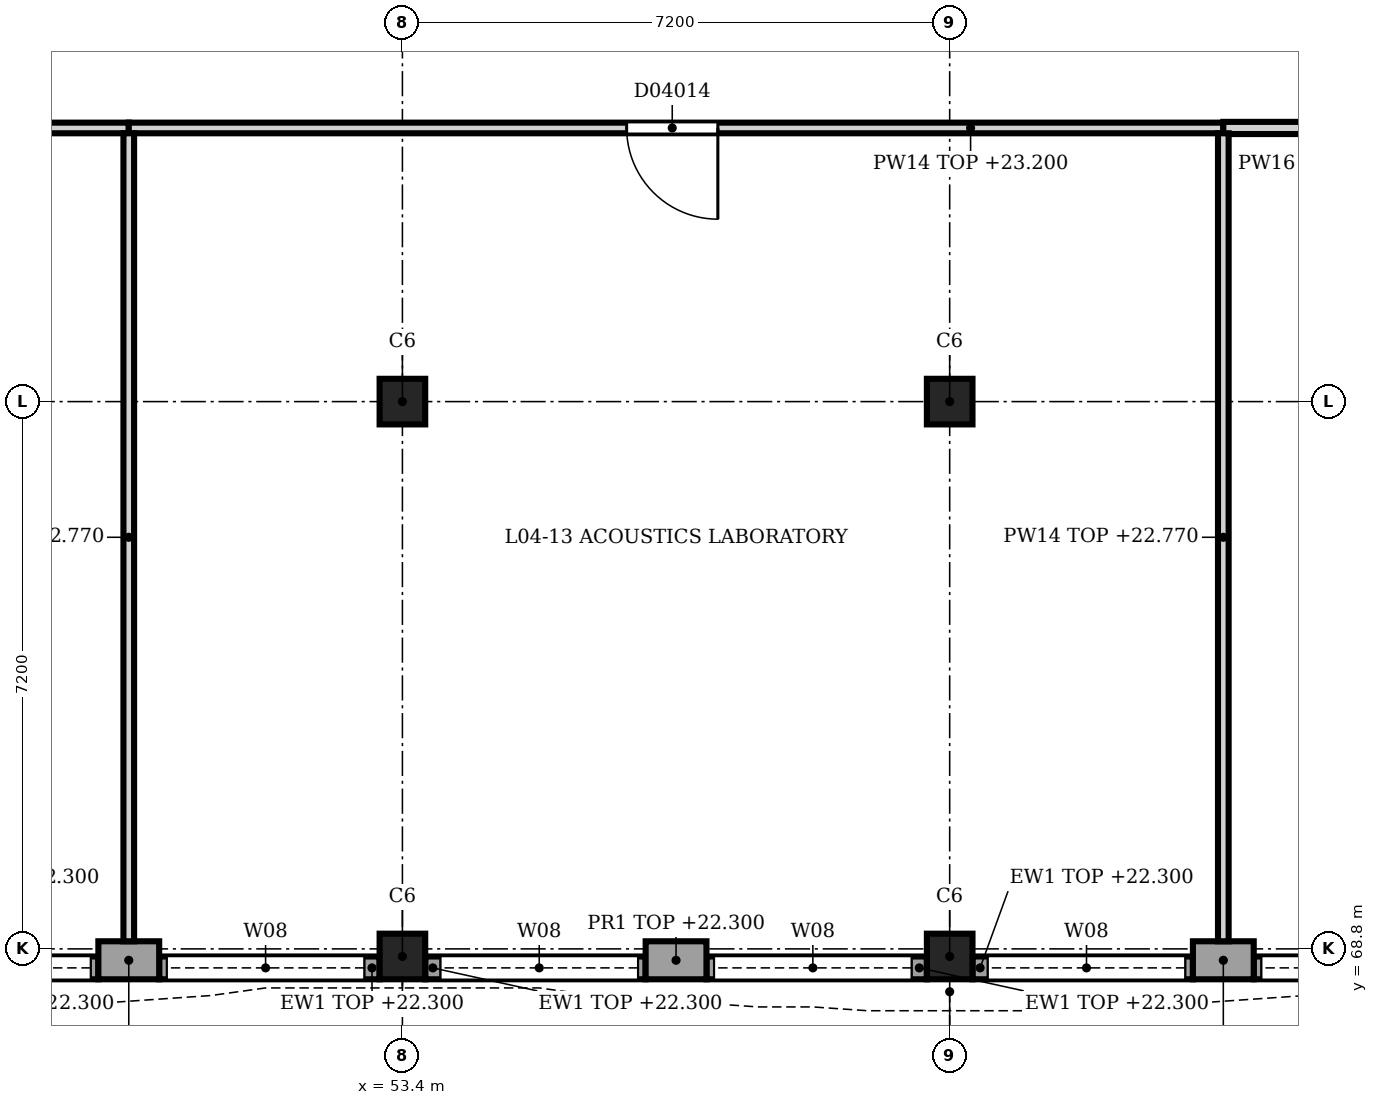
"""IFC4 building model, lengths in metres.
Left out: names, types, materials, properties, quantities, classifications, styles, units other than length and angle.
Written with IfcOpenShell. Run it as: python <this file> out.ifc"""

import sys

from ifc_helpers import new_model, si_unit, direction, frame, frame_2d, origin, origin_2d, place, context, subcontext, project, spatial, rectangle, extrude, element, fill, save


model = new_model("IFC4")
c1 = context("Model", 3, precision=1e-05, world=origin(), true_north=direction((0.0, 1.0)))
c2 = subcontext(c1, "Body", "Model", "MODEL_VIEW")
j1 = project(units=[si_unit("LENGTHUNIT", "METRE"), si_unit("PLANEANGLEUNIT", "RADIAN")], contexts=[c1])
p1 = place(None, origin())
s1 = spatial("IfcSite", under=j1, at=p1, CompositionType="ELEMENT")
p2 = place(p1, origin())
s2 = spatial("IfcBuilding", under=s1, at=p2, CompositionType="ELEMENT")
p3 = place(p2, frame((0.0, 0.0, 18.9)))
s3 = spatial("IfcBuildingStorey", under=s2, at=p3, CompositionType="ELEMENT", Elevation=18.9)
for number, where, z_axis, x_axis in (
    (1, (53.4, 68.7, 0.0), (0.0, 0.0, 1.0), (1.0, 0.0, 0.0)),
    (2, (53.4, 76.0, 0.0), (0.0, 0.0, 1.0), (1.0, 0.0, 0.0)),
    (3, (60.6, 68.7, 0.0), (0.0, 0.0, 1.0), (1.0, 0.0, 0.0)),
    (4, (60.6, 76.0, 0.0), (0.0, 0.0, 1.0), (1.0, 0.0, 0.0)),
):
    element("IfcColumn", number, at=place(p3, frame(where, z_axis=z_axis, x_axis=x_axis)), inside=s3, PredefinedType="COLUMN", context=c2, shape_type="SweptSolid", body=[
        extrude(rectangle(XDim=0.6, YDim=0.6, at=origin_2d()), origin(), (0.0, 0.0, 1.0), 4.5),
    ])
p4 = place(p3, frame((64.6, 68.65, 0.0), z_axis=(0.0, 0.0, 1.0), x_axis=(-1.0, 0.0, 0.0)))
e5 = element("IfcWall", 5, at=p4, inside=s3, PredefinedType="SOLIDWALL", context=c2, shape_type="SweptSolid", body=[
    extrude(rectangle(XDim=0.8, YDim=0.5, at=frame_2d((0.4, 0.0))), origin(), (0.0, 0.0, 1.0), 3.4),
])
p5 = place(p3, frame((57.4, 68.65, 0.0), z_axis=(0.0, 0.0, 1.0), x_axis=(-1.0, 0.0, 0.0)))
e6 = element("IfcWall", 6, at=p5, inside=s3, PredefinedType="SOLIDWALL", context=c2, shape_type="SweptSolid", body=[
    extrude(rectangle(XDim=0.8, YDim=0.5, at=frame_2d((0.4, 0.0))), origin(), (0.0, 0.0, 1.0), 3.4),
])
p6 = place(p3, frame((50.2, 68.65, 0.0), z_axis=(0.0, 0.0, 1.0), x_axis=(-1.0, 0.0, 0.0)))
e7 = element("IfcWall", 7, at=p6, inside=s3, PredefinedType="SOLIDWALL", context=c2, shape_type="SweptSolid", body=[
    extrude(rectangle(XDim=0.8, YDim=0.5, at=frame_2d((0.4, 0.0))), origin(), (0.0, 0.0, 1.0), 3.4),
])
p7 = place(p3, frame((67.5, 68.55, 0.0), z_axis=(0.0, 0.0, 1.0), x_axis=(-1.0, 0.0, 0.0)))
e8 = element("IfcWall", 8, at=p7, inside=s3, PredefinedType="SOLIDWALL", context=c2, shape_type="SweptSolid", body=[
    extrude(rectangle(XDim=2.9, YDim=0.3, at=frame_2d((1.45, 0.0))), origin(), (0.0, 0.0, 1.0), 3.4),
])
p8 = place(p7, frame((0.2, 0.0, 1.2)))
e9 = element("IfcOpeningElement", 9, at=p8, cuts=e8, PredefinedType="OPENING", context=c2, shape_type="SweptSolid", body=[
    extrude(rectangle(XDim=2.6, YDim=2.1, at=frame_2d((1.3, 1.05))), frame((0.0, 0.16, 0.0), z_axis=(0.0, -1.0, 0.0), x_axis=(1.0, 0.0, 0.0)), (0.0, 0.0, 1.0), 0.32),
])
p9 = place(p3, frame((63.8, 68.55, 0.0), z_axis=(0.0, 0.0, 1.0), x_axis=(-1.0, 0.0, 0.0)))
e10 = element("IfcWall", 10, at=p9, inside=s3, PredefinedType="SOLIDWALL", context=c2, shape_type="SweptSolid", body=[
    extrude(rectangle(XDim=2.9, YDim=0.3, at=frame_2d((1.45, 0.0))), origin(), (0.0, 0.0, 1.0), 3.4),
])
p10 = place(p9, frame((0.1, 0.0, 1.2)))
e11 = element("IfcOpeningElement", 11, at=p10, cuts=e10, PredefinedType="OPENING", context=c2, shape_type="SweptSolid", body=[
    extrude(rectangle(XDim=2.6, YDim=2.1, at=frame_2d((1.3, 1.05))), frame((0.0, 0.16, 0.0), z_axis=(0.0, -1.0, 0.0), x_axis=(1.0, 0.0, 0.0)), (0.0, 0.0, 1.0), 0.32),
])
p11 = place(p3, frame((60.3, 68.55, 0.0), z_axis=(0.0, 0.0, 1.0), x_axis=(-1.0, 0.0, 0.0)))
e12 = element("IfcWall", 12, at=p11, inside=s3, PredefinedType="SOLIDWALL", context=c2, shape_type="SweptSolid", body=[
    extrude(rectangle(XDim=2.9, YDim=0.3, at=frame_2d((1.45, 0.0))), origin(), (0.0, 0.0, 1.0), 3.4),
])
p12 = place(p11, frame((0.2, 0.0, 1.2)))
e13 = element("IfcOpeningElement", 13, at=p12, cuts=e12, PredefinedType="OPENING", context=c2, shape_type="SweptSolid", body=[
    extrude(rectangle(XDim=2.6, YDim=2.1, at=frame_2d((1.3, 1.05))), frame((0.0, 0.16, 0.0), z_axis=(0.0, -1.0, 0.0), x_axis=(1.0, 0.0, 0.0)), (0.0, 0.0, 1.0), 0.32),
])
p13 = place(p3, frame((56.6, 68.55, 0.0), z_axis=(0.0, 0.0, 1.0), x_axis=(-1.0, 0.0, 0.0)))
e14 = element("IfcWall", 14, at=p13, inside=s3, PredefinedType="SOLIDWALL", context=c2, shape_type="SweptSolid", body=[
    extrude(rectangle(XDim=2.9, YDim=0.3, at=frame_2d((1.45, 0.0))), origin(), (0.0, 0.0, 1.0), 3.4),
])
p14 = place(p13, frame((0.1, 0.0, 1.2)))
e15 = element("IfcOpeningElement", 15, at=p14, cuts=e14, PredefinedType="OPENING", context=c2, shape_type="SweptSolid", body=[
    extrude(rectangle(XDim=2.6, YDim=2.1, at=frame_2d((1.3, 1.05))), frame((0.0, 0.16, 0.0), z_axis=(0.0, -1.0, 0.0), x_axis=(1.0, 0.0, 0.0)), (0.0, 0.0, 1.0), 0.32),
])
p15 = place(p3, frame((53.1, 68.55, 0.0), z_axis=(0.0, 0.0, 1.0), x_axis=(-1.0, 0.0, 0.0)))
e16 = element("IfcWall", 16, at=p15, inside=s3, PredefinedType="SOLIDWALL", context=c2, shape_type="SweptSolid", body=[
    extrude(rectangle(XDim=2.9, YDim=0.3, at=frame_2d((1.45, 0.0))), origin(), (0.0, 0.0, 1.0), 3.4),
])
p16 = place(p15, frame((0.2, 0.0, 1.2)))
e17 = element("IfcOpeningElement", 17, at=p16, cuts=e16, PredefinedType="OPENING", context=c2, shape_type="SweptSolid", body=[
    extrude(rectangle(XDim=2.6, YDim=2.1, at=frame_2d((1.3, 1.05))), frame((0.0, 0.16, 0.0), z_axis=(0.0, -1.0, 0.0), x_axis=(1.0, 0.0, 0.0)), (0.0, 0.0, 1.0), 0.32),
])
p17 = place(p3, frame((49.4, 68.55, 0.0), z_axis=(0.0, 0.0, 1.0), x_axis=(-1.0, 0.0, 0.0)))
e18 = element("IfcWall", 18, at=p17, inside=s3, PredefinedType="SOLIDWALL", context=c2, shape_type="SweptSolid", body=[
    extrude(rectangle(XDim=2.9, YDim=0.3, at=frame_2d((1.45, 0.0))), origin(), (0.0, 0.0, 1.0), 3.4),
])
p18 = place(p17, frame((0.1, 0.0, 1.2)))
e19 = element("IfcOpeningElement", 19, at=p18, cuts=e18, PredefinedType="OPENING", context=c2, shape_type="SweptSolid", body=[
    extrude(rectangle(XDim=2.6, YDim=2.1, at=frame_2d((1.3, 1.05))), frame((0.0, 0.16, 0.0), z_axis=(0.0, -1.0, 0.0), x_axis=(1.0, 0.0, 0.0)), (0.0, 0.0, 1.0), 0.32),
])
p19 = place(p3, frame((49.8, 79.6, 0.0), z_axis=(0.0, 0.0, 1.0), x_axis=(-1.0, 0.0, 0.0)))
e20 = element("IfcWall", 20, at=p19, inside=s3, PredefinedType="PARTITIONING", context=c2, shape_type="SweptSolid", body=[
    extrude(rectangle(XDim=14.4, YDim=0.14, at=frame_2d((7.2, 0.0))), origin(), (0.0, 0.0, 1.0), 4.3),
])
p20 = place(p19, frame((6.65, 0.0, 0.0)))
e21 = element("IfcOpeningElement", 21, at=p20, cuts=e20, PredefinedType="OPENING", context=c2, shape_type="SweptSolid", body=[
    extrude(rectangle(XDim=1.1, YDim=2.2, at=frame_2d((0.55, 1.1))), frame((0.0, 0.08, 0.0), z_axis=(0.0, -1.0, 0.0), x_axis=(1.0, 0.0, 0.0)), (0.0, 0.0, 1.0), 0.16),
])
p21 = place(p3, frame((64.2, 79.6, 0.0), z_axis=(0.0, 0.0, 1.0), x_axis=(-1.0, 0.0, 0.0)))
e22 = element("IfcWall", 22, at=p21, inside=s3, PredefinedType="PARTITIONING", context=c2, shape_type="SweptSolid", body=[
    extrude(rectangle(XDim=14.4, YDim=0.14, at=frame_2d((7.2, 0.0))), origin(), (0.0, 0.0, 1.0), 4.3),
])
p22 = place(p21, frame((6.65, 0.0, 0.0)))
e23 = element("IfcOpeningElement", 23, at=p22, cuts=e22, PredefinedType="OPENING", context=c2, shape_type="SweptSolid", body=[
    extrude(rectangle(XDim=1.2, YDim=2.1, at=frame_2d((0.6, 1.05))), frame((0.0, 0.08, 0.0), z_axis=(0.0, -1.0, 0.0), x_axis=(1.0, 0.0, 0.0)), (0.0, 0.0, 1.0), 0.16),
])
p23 = place(p3, frame((71.4, 79.6, 0.0), z_axis=(0.0, 0.0, 1.0), x_axis=(-1.0, 0.0, 0.0)))
e24 = element("IfcWall", 24, at=p23, inside=s3, PredefinedType="PARTITIONING", context=c2, shape_type="SweptSolid", body=[
    extrude(rectangle(XDim=7.2, YDim=0.16, at=frame_2d((3.6, 0.0))), origin(), (0.0, 0.0, 1.0), 4.3),
])
p24 = place(p23, frame((2.95, 0.0, 0.0)))
e25 = element("IfcOpeningElement", 25, at=p24, cuts=e24, PredefinedType="OPENING", context=c2, shape_type="SweptSolid", body=[
    extrude(rectangle(XDim=1.3, YDim=2.2, at=frame_2d((0.65, 1.1))), frame((0.0, 0.09, 0.0), z_axis=(0.0, -1.0, 0.0), x_axis=(1.0, 0.0, 0.0)), (0.0, 0.0, 1.0), 0.18),
])
for number, where, z_axis, x_axis in (
    (26, (49.8, 68.9, 0.0), (0.0, 0.0, 1.0), (0.0, 1.0, 0.0)),
    (27, (64.2, 68.9, 0.0), (0.0, 0.0, 1.0), (0.0, 1.0, 0.0)),
):
    element("IfcWall", number, at=place(p3, frame(where, z_axis=z_axis, x_axis=x_axis)), inside=s3, PredefinedType="PARTITIONING", context=c2, shape_type="SweptSolid", body=[
        extrude(rectangle(XDim=10.63, YDim=0.14, at=frame_2d((5.315, 0.0))), origin(), (0.0, 0.0, 1.0), 3.87),
    ])
p25 = place(p8, origin())
e28 = element("IfcWindow", 28, at=p25, inside=s3, PartitioningType="SINGLE_PANEL", PredefinedType="WINDOW", context=c2, shape_type="SweptSolid", body=[
    extrude(rectangle(XDim=2.6, YDim=2.1, at=frame_2d((1.3, 1.05))), frame((0.0, 0.03, 0.0), z_axis=(0.0, -1.0, 0.0), x_axis=(1.0, 0.0, 0.0)), (0.0, 0.0, 1.0), 0.06),
])
fill(e9, e28)
p26 = place(p10, origin())
e29 = element("IfcWindow", 29, at=p26, inside=s3, PartitioningType="SINGLE_PANEL", PredefinedType="WINDOW", context=c2, shape_type="SweptSolid", body=[
    extrude(rectangle(XDim=2.6, YDim=2.1, at=frame_2d((1.3, 1.05))), frame((0.0, 0.03, 0.0), z_axis=(0.0, -1.0, 0.0), x_axis=(1.0, 0.0, 0.0)), (0.0, 0.0, 1.0), 0.06),
])
fill(e11, e29)
p27 = place(p12, origin())
e30 = element("IfcWindow", 30, at=p27, inside=s3, PartitioningType="SINGLE_PANEL", PredefinedType="WINDOW", context=c2, shape_type="SweptSolid", body=[
    extrude(rectangle(XDim=2.6, YDim=2.1, at=frame_2d((1.3, 1.05))), frame((0.0, 0.03, 0.0), z_axis=(0.0, -1.0, 0.0), x_axis=(1.0, 0.0, 0.0)), (0.0, 0.0, 1.0), 0.06),
])
fill(e13, e30)
p28 = place(p14, origin())
e31 = element("IfcWindow", 31, at=p28, inside=s3, PartitioningType="SINGLE_PANEL", PredefinedType="WINDOW", context=c2, shape_type="SweptSolid", body=[
    extrude(rectangle(XDim=2.6, YDim=2.1, at=frame_2d((1.3, 1.05))), frame((0.0, 0.03, 0.0), z_axis=(0.0, -1.0, 0.0), x_axis=(1.0, 0.0, 0.0)), (0.0, 0.0, 1.0), 0.06),
])
fill(e15, e31)
p29 = place(p16, origin())
e32 = element("IfcWindow", 32, at=p29, inside=s3, PartitioningType="SINGLE_PANEL", PredefinedType="WINDOW", context=c2, shape_type="SweptSolid", body=[
    extrude(rectangle(XDim=2.6, YDim=2.1, at=frame_2d((1.3, 1.05))), frame((0.0, 0.03, 0.0), z_axis=(0.0, -1.0, 0.0), x_axis=(1.0, 0.0, 0.0)), (0.0, 0.0, 1.0), 0.06),
])
fill(e17, e32)
p30 = place(p18, origin())
e33 = element("IfcWindow", 33, at=p30, inside=s3, PartitioningType="SINGLE_PANEL", PredefinedType="WINDOW", context=c2, shape_type="SweptSolid", body=[
    extrude(rectangle(XDim=2.6, YDim=2.1, at=frame_2d((1.3, 1.05))), frame((0.0, 0.03, 0.0), z_axis=(0.0, -1.0, 0.0), x_axis=(1.0, 0.0, 0.0)), (0.0, 0.0, 1.0), 0.06),
])
fill(e19, e33)
p31 = place(p22, origin())
e34 = element("IfcDoor", 34, at=p31, inside=s3, OperationType="SINGLE_SWING_RIGHT", PredefinedType="DOOR", context=c2, shape_type="SweptSolid", body=[
    extrude(rectangle(XDim=1.2, YDim=2.1, at=frame_2d((0.6, 1.05))), frame((0.0, 0.025, 0.0), z_axis=(0.0, -1.0, 0.0), x_axis=(1.0, 0.0, 0.0)), (0.0, 0.0, 1.0), 0.05),
])
fill(e23, e34)
save(model, sys.argv[1])
